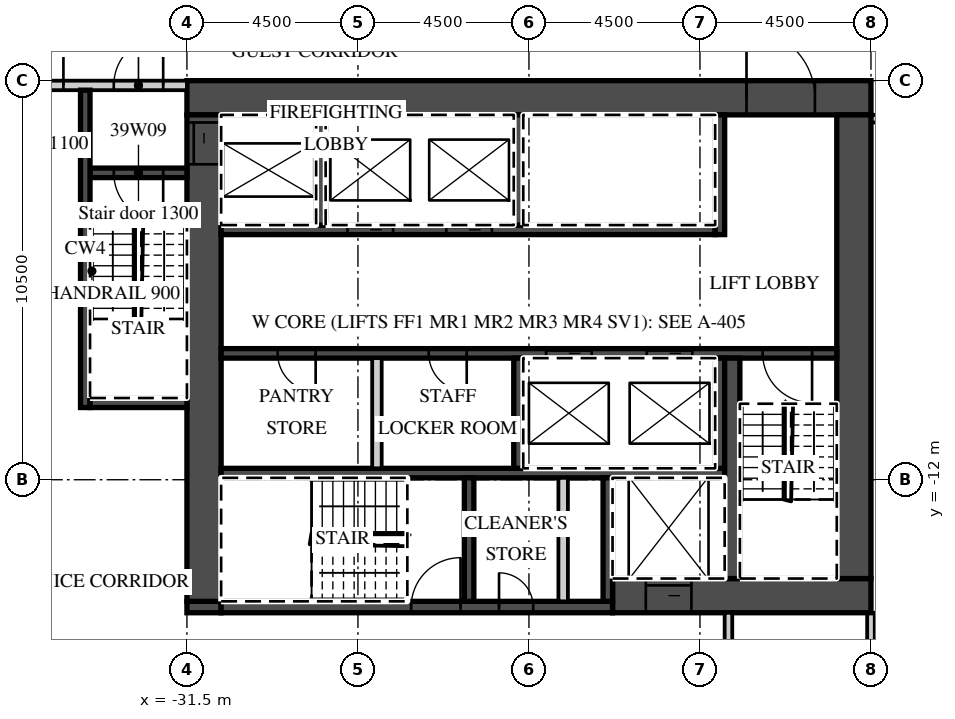
"""IFC4 building model, lengths in metres.
Left out: names, types, materials, properties, quantities, classifications, styles, units other than length and angle.
Written with IfcOpenShell. Run it as: python <this file> out.ifc"""

import sys

from ifc_helpers import new_model, si_unit, direction, frame, frame_2d, origin, place, context, subcontext, project, spatial, rectangle, extrude, element, fill, save


model = new_model("IFC4")
c1 = context("Model", 3, precision=1e-05, world=origin(), true_north=direction((0.0, 1.0)))
c2 = subcontext(c1, "Body", "Model", "MODEL_VIEW")
j1 = project(units=[si_unit("LENGTHUNIT", "METRE"), si_unit("PLANEANGLEUNIT", "RADIAN")], contexts=[c1])
p1 = place(None, origin())
s1 = spatial("IfcSite", under=j1, at=p1, CompositionType="ELEMENT")
p2 = place(p1, origin())
s2 = spatial("IfcBuilding", under=s1, at=p2, CompositionType="ELEMENT")
p3 = place(p2, frame((0.0, 0.0, 170.2)))
s3 = spatial("IfcBuildingStorey", under=s2, at=p3, CompositionType="ELEMENT", Elevation=170.2)
p4 = place(p3, frame((-13.5, -22.3, 0.0), z_axis=(0.0, 0.0, 1.0), x_axis=(0.0, 1.0, 0.0)))
e1 = element("IfcWall", 1, at=p4, inside=s3, PredefinedType="PARTITIONING", context=c2, shape_type="SweptSolid", body=[
    extrude(rectangle(XDim=6.8, YDim=0.2, at=frame_2d((3.4, 0.0))), origin(), (0.0, 0.0, 1.0), 3.02),
])
p5 = place(p3, frame((-13.5, -2.5, 0.0), z_axis=(0.0, 0.0, 1.0), x_axis=(1.0, 0.0, 0.0)))
e2 = element("IfcWall", 2, at=p5, inside=s3, PredefinedType="PARTITIONING", context=c2, shape_type="SweptSolid", body=[
    extrude(rectangle(XDim=27.0, YDim=0.2, at=frame_2d((13.5, 0.0))), origin(), (0.0, 0.0, 1.0), 3.02),
])
p6 = place(p5, frame((0.575, 0.0, 0.0)))
e3 = element("IfcOpeningElement", 3, at=p6, cuts=e2, PredefinedType="OPENING", context=c2, shape_type="SweptSolid", body=[
    extrude(rectangle(XDim=1.0, YDim=2.1, at=frame_2d((0.5, 1.05))), frame((0.0, 0.11, 0.0), z_axis=(0.0, -1.0, 0.0), x_axis=(1.0, 0.0, 0.0)), (0.0, 0.0, 1.0), 0.22),
])
p7 = place(p5, frame((9.863, 0.0, 0.0)))
e4 = element("IfcOpeningElement", 4, at=p7, cuts=e2, PredefinedType="OPENING", context=c2, shape_type="SweptSolid", body=[
    extrude(rectangle(XDim=1.2, YDim=2.1, at=frame_2d((0.6, 1.05))), frame((0.0, 0.11, 0.0), z_axis=(0.0, -1.0, 0.0), x_axis=(1.0, 0.0, 0.0)), (0.0, 0.0, 1.0), 0.22),
])
p8 = place(p5, frame((15.938, 0.0, 0.0)))
e5 = element("IfcOpeningElement", 5, at=p8, cuts=e2, PredefinedType="OPENING", context=c2, shape_type="SweptSolid", body=[
    extrude(rectangle(XDim=1.2, YDim=2.1, at=frame_2d((0.6, 1.05))), frame((0.0, 0.11, 0.0), z_axis=(0.0, -1.0, 0.0), x_axis=(1.0, 0.0, 0.0)), (0.0, 0.0, 1.0), 0.22),
])
p9 = place(p5, frame((23.075, 0.0, 0.0)))
e6 = element("IfcOpeningElement", 6, at=p9, cuts=e2, PredefinedType="OPENING", context=c2, shape_type="SweptSolid", body=[
    extrude(rectangle(XDim=1.0, YDim=2.1, at=frame_2d((0.5, 1.05))), frame((0.0, 0.11, 0.0), z_axis=(0.0, -1.0, 0.0), x_axis=(1.0, 0.0, 0.0)), (0.0, 0.0, 1.0), 0.22),
])
p10 = place(p3, frame((-31.5, -1.95, 0.0), z_axis=(0.0, 0.0, 1.0), x_axis=(1.0, 0.0, 0.0)))
e7 = element("IfcWall", 7, at=p10, inside=s3, PredefinedType="SHEAR", context=c2, shape_type="SweptSolid", body=[
    extrude(rectangle(XDim=18.0, YDim=0.9, at=frame_2d((9.0, 0.0))), origin(), (0.0, 0.0, 1.0), 3.02),
])
p11 = place(p10, frame((14.725, 0.0, 0.0)))
e8 = element("IfcOpeningElement", 8, at=p11, cuts=e7, PredefinedType="OPENING", context=c2, shape_type="SweptSolid", body=[
    extrude(rectangle(XDim=1.8, YDim=2.1, at=frame_2d((0.9, 1.05))), frame((0.0, 0.46, 0.0), z_axis=(0.0, -1.0, 0.0), x_axis=(1.0, 0.0, 0.0)), (0.0, 0.0, 1.0), 0.92),
])
p12 = place(p3, frame((-20.3, -15.05, 0.0), z_axis=(0.0, 0.0, 1.0), x_axis=(1.0, 0.0, 0.0)))
e9 = element("IfcWall", 9, at=p12, inside=s3, PredefinedType="SHEAR", context=c2, shape_type="SweptSolid", body=[
    extrude(rectangle(XDim=6.8, YDim=0.9, at=frame_2d((3.4, 0.0))), origin(), (0.0, 0.0, 1.0), 3.02),
])
p13 = place(p12, frame((0.875, 0.0, 0.0)))
e10 = element("IfcOpeningElement", 10, at=p13, cuts=e9, PredefinedType="OPENING", context=c2, shape_type="SweptSolid", body=[
    extrude(rectangle(XDim=1.2, YDim=2.1, at=frame_2d((0.6, 1.05))), frame((0.0, 0.46, 0.0), z_axis=(0.0, -1.0, 0.0), x_axis=(1.0, 0.0, 0.0)), (0.0, 0.0, 1.0), 0.92),
])
p14 = place(p3, frame((-31.5, -15.35, 0.0), z_axis=(0.0, 0.0, 1.0), x_axis=(1.0, 0.0, 0.0)))
e11 = element("IfcWall", 11, at=p14, inside=s3, PredefinedType="SHEAR", context=c2, shape_type="SweptSolid", body=[
    extrude(rectangle(XDim=0.9, YDim=0.3, at=frame_2d((0.45, 0.0))), origin(), (0.0, 0.0, 1.0), 3.02),
])
p15 = place(p3, frame((-30.6, -15.35, 0.0), z_axis=(0.0, 0.0, 1.0), x_axis=(1.0, 0.0, 0.0)))
e12 = element("IfcWall", 12, at=p15, inside=s3, PredefinedType="SHEAR", context=c2, shape_type="SweptSolid", body=[
    extrude(rectangle(XDim=10.3, YDim=0.3, at=frame_2d((5.15, 0.0))), origin(), (0.0, 0.0, 1.0), 3.02),
])
p16 = place(p15, frame((5.0, 0.0, 0.0)))
e13 = element("IfcOpeningElement", 13, at=p16, cuts=e12, PredefinedType="OPENING", context=c2, shape_type="SweptSolid", body=[
    extrude(rectangle(XDim=1.3, YDim=2.1, at=frame_2d((0.65, 1.05))), frame((0.0, 0.16, 0.0), z_axis=(0.0, -1.0, 0.0), x_axis=(1.0, 0.0, 0.0)), (0.0, 0.0, 1.0), 0.32),
])
p17 = place(p15, frame((7.312, 0.0, 0.0)))
e14 = element("IfcOpeningElement", 14, at=p17, cuts=e12, PredefinedType="OPENING", context=c2, shape_type="SweptSolid", body=[
    extrude(rectangle(XDim=0.9, YDim=2.1, at=frame_2d((0.45, 1.05))), frame((0.0, 0.16, 0.0), z_axis=(0.0, -1.0, 0.0), x_axis=(1.0, 0.0, 0.0)), (0.0, 0.0, 1.0), 0.32),
])
p18 = place(p3, frame((-31.05, -15.2, 0.0), z_axis=(0.0, 0.0, 1.0), x_axis=(0.0, 1.0, 0.0)))
e15 = element("IfcWall", 15, at=p18, inside=s3, PredefinedType="SHEAR", context=c2, shape_type="SweptSolid", body=[
    extrude(rectangle(XDim=12.8, YDim=0.9, at=frame_2d((6.4, 0.0))), origin(), (0.0, 0.0, 1.0), 3.02),
])
p19 = place(p18, frame((11.5, 0.0, 0.0)))
e16 = element("IfcOpeningElement", 16, at=p19, cuts=e15, PredefinedType="OPENING", context=c2, shape_type="SweptSolid", body=[
    extrude(rectangle(XDim=1.1, YDim=2.1, at=frame_2d((0.55, 1.05))), frame((0.0, 0.46, 0.0), z_axis=(0.0, -1.0, 0.0), x_axis=(1.0, 0.0, 0.0)), (0.0, 0.0, 1.0), 0.92),
])
p20 = place(p3, frame((-13.95, -14.6, 0.0), z_axis=(0.0, 0.0, 1.0), x_axis=(0.0, 1.0, 0.0)))
e17 = element("IfcWall", 17, at=p20, inside=s3, PredefinedType="SHEAR", context=c2, shape_type="SweptSolid", body=[
    extrude(rectangle(XDim=12.2, YDim=0.9, at=frame_2d((6.1, 0.0))), origin(), (0.0, 0.0, 1.0), 3.02),
])
p21 = place(p3, frame((-30.6, -5.425, 0.0), z_axis=(0.0, 0.0, 1.0), x_axis=(1.0, 0.0, 0.0)))
e18 = element("IfcWall", 18, at=p21, inside=s3, PredefinedType="SHEAR", context=c2, shape_type="SweptSolid", body=[
    extrude(rectangle(XDim=13.0, YDim=0.25, at=frame_2d((6.5, 0.0))), origin(), (0.0, 0.0, 1.0), 3.02),
])
p22 = place(p21, frame((3.325, 0.0, 0.0)))
e19 = element("IfcOpeningElement", 19, at=p22, cuts=e18, PredefinedType="OPENING", context=c2, shape_type="SweptSolid", body=[
    extrude(rectangle(XDim=1.2, YDim=2.1, at=frame_2d((0.6, 1.05))), frame((0.0, 0.135, 0.0), z_axis=(0.0, -1.0, 0.0), x_axis=(1.0, 0.0, 0.0)), (0.0, 0.0, 1.0), 0.27),
])
p23 = place(p21, frame((5.925, 0.0, 0.0)))
e20 = element("IfcOpeningElement", 20, at=p23, cuts=e18, PredefinedType="OPENING", context=c2, shape_type="SweptSolid", body=[
    extrude(rectangle(XDim=1.2, YDim=2.1, at=frame_2d((0.6, 1.05))), frame((0.0, 0.135, 0.0), z_axis=(0.0, -1.0, 0.0), x_axis=(1.0, 0.0, 0.0)), (0.0, 0.0, 1.0), 0.27),
])
p24 = place(p3, frame((-17.475, -5.55, 0.0), z_axis=(0.0, 0.0, 1.0), x_axis=(0.0, 1.0, 0.0)))
e21 = element("IfcWall", 21, at=p24, inside=s3, PredefinedType="SHEAR", context=c2, shape_type="SweptSolid", body=[
    extrude(rectangle(XDim=3.15, YDim=0.25, at=frame_2d((1.575, 0.0))), origin(), (0.0, 0.0, 1.0), 3.02),
])
for number, where, z_axis, x_axis in (
    (22, (-27.975, -5.3, 0.0), (0.0, 0.0, 1.0), (0.0, 1.0, 0.0)),
    (23, (-22.775, -5.3, 0.0), (0.0, 0.0, 1.0), (0.0, 1.0, 0.0)),
):
    element("IfcWall", number, at=place(p3, frame(where, z_axis=z_axis, x_axis=x_axis)), inside=s3, PredefinedType="SHEAR", context=c2, shape_type="SweptSolid", body=[
        extrude(rectangle(XDim=2.9, YDim=0.25, at=frame_2d((1.45, 0.0))), origin(), (0.0, 0.0, 1.0), 3.02),
    ])
p25 = place(p3, frame((-30.6, -8.675, 0.0), z_axis=(0.0, 0.0, 1.0), x_axis=(1.0, 0.0, 0.0)))
e24 = element("IfcWall", 24, at=p25, inside=s3, PredefinedType="SHEAR", context=c2, shape_type="SweptSolid", body=[
    extrude(rectangle(XDim=16.2, YDim=0.25, at=frame_2d((8.1, 0.0))), origin(), (0.0, 0.0, 1.0), 3.02),
])
p26 = place(p25, frame((8.55, 0.0, 0.0)))
e25 = element("IfcOpeningElement", 25, at=p26, cuts=e24, PredefinedType="OPENING", context=c2, shape_type="SweptSolid", body=[
    extrude(rectangle(XDim=1.2, YDim=2.1, at=frame_2d((0.6, 1.05))), frame((0.0, 0.135, 0.0), z_axis=(0.0, -1.0, 0.0), x_axis=(1.0, 0.0, 0.0)), (0.0, 0.0, 1.0), 0.27),
])
p27 = place(p25, frame((11.2, 0.0, 0.0)))
e26 = element("IfcOpeningElement", 26, at=p27, cuts=e24, PredefinedType="OPENING", context=c2, shape_type="SweptSolid", body=[
    extrude(rectangle(XDim=1.2, YDim=2.1, at=frame_2d((0.6, 1.05))), frame((0.0, 0.135, 0.0), z_axis=(0.0, -1.0, 0.0), x_axis=(1.0, 0.0, 0.0)), (0.0, 0.0, 1.0), 0.27),
])
p28 = place(p25, frame((14.25, 0.0, 0.0)))
e27 = element("IfcOpeningElement", 27, at=p28, cuts=e24, PredefinedType="OPENING", context=c2, shape_type="SweptSolid", body=[
    extrude(rectangle(XDim=1.3, YDim=2.1, at=frame_2d((0.65, 1.05))), frame((0.0, 0.135, 0.0), z_axis=(0.0, -1.0, 0.0), x_axis=(1.0, 0.0, 0.0)), (0.0, 0.0, 1.0), 0.27),
])
p29 = place(p25, frame((1.488, 0.0, 0.0)))
e28 = element("IfcOpeningElement", 28, at=p29, cuts=e24, PredefinedType="OPENING", context=c2, shape_type="SweptSolid", body=[
    extrude(rectangle(XDim=1.0, YDim=2.1, at=frame_2d((0.5, 1.05))), frame((0.0, 0.135, 0.0), z_axis=(0.0, -1.0, 0.0), x_axis=(1.0, 0.0, 0.0)), (0.0, 0.0, 1.0), 0.27),
])
p30 = place(p25, frame((5.462, 0.0, 0.0)))
e29 = element("IfcOpeningElement", 29, at=p30, cuts=e24, PredefinedType="OPENING", context=c2, shape_type="SweptSolid", body=[
    extrude(rectangle(XDim=1.0, YDim=2.1, at=frame_2d((0.5, 1.05))), frame((0.0, 0.135, 0.0), z_axis=(0.0, -1.0, 0.0), x_axis=(1.0, 0.0, 0.0)), (0.0, 0.0, 1.0), 0.27),
])
p31 = place(p3, frame((-30.6, -11.825, 0.0), z_axis=(0.0, 0.0, 1.0), x_axis=(1.0, 0.0, 0.0)))
e30 = element("IfcWall", 30, at=p31, inside=s3, PredefinedType="SHEAR", context=c2, shape_type="SweptSolid", body=[
    extrude(rectangle(XDim=13.25, YDim=0.25, at=frame_2d((6.625, 0.0))), origin(), (0.0, 0.0, 1.0), 3.02),
])
for number, where, z_axis, x_axis in (
    (31, (-17.475, -11.7, 0.0), (0.0, 0.0, 1.0), (0.0, 1.0, 0.0)),
    (32, (-22.775, -11.7, 0.0), (0.0, 0.0, 1.0), (0.0, 1.0, 0.0)),
):
    element("IfcWall", number, at=place(p3, frame(where, z_axis=z_axis, x_axis=x_axis)), inside=s3, PredefinedType="SHEAR", context=c2, shape_type="SweptSolid", body=[
        extrude(rectangle(XDim=2.9, YDim=0.25, at=frame_2d((1.45, 0.0))), origin(), (0.0, 0.0, 1.0), 3.02),
    ])
p32 = place(p3, frame((-26.5, -11.7, 0.0), z_axis=(0.0, 0.0, 1.0), x_axis=(0.0, 1.0, 0.0)))
e33 = element("IfcWall", 33, at=p32, inside=s3, PredefinedType="PARTITIONING", context=c2, shape_type="SweptSolid", body=[
    extrude(rectangle(XDim=2.9, YDim=0.25, at=frame_2d((1.45, 0.0))), origin(), (0.0, 0.0, 1.0), 3.02),
])
p33 = place(p3, frame((-17.15, -14.6, 0.0), z_axis=(0.0, 0.0, 1.0), x_axis=(0.0, 1.0, 0.0)))
e34 = element("IfcWall", 34, at=p33, inside=s3, PredefinedType="SHEAR", context=c2, shape_type="SweptSolid", body=[
    extrude(rectangle(XDim=5.8, YDim=0.4, at=frame_2d((2.9, 0.0))), origin(), (0.0, 0.0, 1.0), 3.02),
])
for number, where, z_axis, x_axis in (
    (35, (-20.425, -15.2, 0.0), (0.0, 0.0, 1.0), (0.0, 1.0, 0.0)),
    (36, (-24.075, -15.2, 0.0), (0.0, 0.0, 1.0), (0.0, 1.0, 0.0)),
):
    element("IfcWall", number, at=place(p3, frame(where, z_axis=z_axis, x_axis=x_axis)), inside=s3, PredefinedType="SHEAR", context=c2, shape_type="SweptSolid", body=[
        extrude(rectangle(XDim=3.25, YDim=0.25, at=frame_2d((1.625, 0.0))), origin(), (0.0, 0.0, 1.0), 3.02),
    ])
p34 = place(p3, frame((-21.6, -15.2, 0.0), z_axis=(0.0, 0.0, 1.0), x_axis=(0.0, 1.0, 0.0)))
e37 = element("IfcWall", 37, at=p34, inside=s3, PredefinedType="PARTITIONING", context=c2, shape_type="SweptSolid", body=[
    extrude(rectangle(XDim=3.25, YDim=0.25, at=frame_2d((1.625, 0.0))), origin(), (0.0, 0.0, 1.0), 3.02),
])
p35 = place(p3, frame((-42.632, -1.625, 0.0), z_axis=(0.0, 0.0, 1.0), x_axis=(1.0, 0.0, 0.0)))
e38 = element("IfcWall", 38, at=p35, inside=s3, PredefinedType="PARTITIONING", context=c2, shape_type="SweptSolid", body=[
    extrude(rectangle(XDim=11.132, YDim=0.25, at=frame_2d((5.566, 0.0))), origin(), (0.0, 0.0, 1.0), 3.02),
])
p36 = place(p35, frame((9.207, 0.0, 0.0)))
e39 = element("IfcOpeningElement", 39, at=p36, cuts=e38, PredefinedType="OPENING", context=c2, shape_type="SweptSolid", body=[
    extrude(rectangle(XDim=1.3, YDim=2.1, at=frame_2d((0.65, 1.05))), frame((0.0, 0.135, 0.0), z_axis=(0.0, -1.0, 0.0), x_axis=(1.0, 0.0, 0.0)), (0.0, 0.0, 1.0), 0.27),
])
p37 = place(p35, frame((6.781, 0.0, 0.0)))
e40 = element("IfcOpeningElement", 40, at=p37, cuts=e38, PredefinedType="OPENING", context=c2, shape_type="SweptSolid", body=[
    extrude(rectangle(XDim=1.1, YDim=2.1, at=frame_2d((0.55, 1.05))), frame((0.0, 0.135, 0.0), z_axis=(0.0, -1.0, 0.0), x_axis=(1.0, 0.0, 0.0)), (0.0, 0.0, 1.0), 0.27),
])
p38 = place(p3, frame((-34.05, -3.925, 0.0), z_axis=(0.0, 0.0, 1.0), x_axis=(1.0, 0.0, 0.0)))
e41 = element("IfcWall", 41, at=p38, inside=s3, PredefinedType="SHEAR", context=c2, shape_type="SweptSolid", body=[
    extrude(rectangle(XDim=2.55, YDim=0.25, at=frame_2d((1.275, 0.0))), origin(), (0.0, 0.0, 1.0), 3.02),
])
p39 = place(p38, frame((0.625, 0.0, 0.0)))
e42 = element("IfcOpeningElement", 42, at=p39, cuts=e41, PredefinedType="OPENING", context=c2, shape_type="SweptSolid", body=[
    extrude(rectangle(XDim=1.3, YDim=2.1, at=frame_2d((0.65, 1.05))), frame((0.0, 0.135, 0.0), z_axis=(0.0, -1.0, 0.0), x_axis=(1.0, 0.0, 0.0)), (0.0, 0.0, 1.0), 0.27),
])
p40 = place(p3, frame((-34.175, -10.1, 0.0), z_axis=(0.0, 0.0, 1.0), x_axis=(0.0, 1.0, 0.0)))
e43 = element("IfcWall", 43, at=p40, inside=s3, PredefinedType="SHEAR", context=c2, shape_type="SweptSolid", body=[
    extrude(rectangle(XDim=8.35, YDim=0.25, at=frame_2d((4.175, 0.0))), origin(), (0.0, 0.0, 1.0), 3.02),
])
p41 = place(p3, frame((-34.05, -9.975, 0.0), z_axis=(0.0, 0.0, 1.0), x_axis=(1.0, 0.0, 0.0)))
e44 = element("IfcWall", 44, at=p41, inside=s3, PredefinedType="SHEAR", context=c2, shape_type="SweptSolid", body=[
    extrude(rectangle(XDim=2.55, YDim=0.25, at=frame_2d((1.275, 0.0))), origin(), (0.0, 0.0, 1.0), 3.02),
])
p42 = place(p3, frame((-17.25, -17.7, 0.0), z_axis=(0.0, 0.0, 1.0), x_axis=(0.0, 1.0, 0.0)))
e45 = element("IfcWall", 45, at=p42, inside=s3, PredefinedType="PARTITIONING", context=c2, shape_type="SweptSolid", body=[
    extrude(rectangle(XDim=2.2, YDim=0.2, at=frame_2d((1.1, 0.0))), origin(), (0.0, 0.0, 1.0), 3.02),
])
p43 = place(p26, origin())
e46 = element("IfcDoor", 46, at=p43, inside=s3, OperationType="SLIDING_TO_LEFT", PredefinedType="DOOR", context=c2, shape_type="SweptSolid", body=[
    extrude(rectangle(XDim=1.2, YDim=2.1, at=frame_2d((0.6, 1.05))), frame((0.0, 0.025, 0.0), z_axis=(0.0, -1.0, 0.0), x_axis=(1.0, 0.0, 0.0)), (0.0, 0.0, 1.0), 0.05),
])
fill(e25, e46)
p44 = place(p27, origin())
e47 = element("IfcDoor", 47, at=p44, inside=s3, OperationType="SLIDING_TO_RIGHT", PredefinedType="DOOR", context=c2, shape_type="SweptSolid", body=[
    extrude(rectangle(XDim=1.2, YDim=2.1, at=frame_2d((0.6, 1.05))), frame((0.0, 0.025, 0.0), z_axis=(0.0, -1.0, 0.0), x_axis=(1.0, 0.0, 0.0)), (0.0, 0.0, 1.0), 0.05),
])
fill(e26, e47)
p45 = place(p22, origin())
e48 = element("IfcDoor", 48, at=p45, inside=s3, OperationType="SLIDING_TO_RIGHT", PredefinedType="DOOR", context=c2, shape_type="SweptSolid", body=[
    extrude(rectangle(XDim=1.2, YDim=2.1, at=frame_2d((0.6, 1.05))), frame((0.0, 0.025, 0.0), z_axis=(0.0, -1.0, 0.0), x_axis=(1.0, 0.0, 0.0)), (0.0, 0.0, 1.0), 0.05),
])
fill(e19, e48)
p46 = place(p23, origin())
e49 = element("IfcDoor", 49, at=p46, inside=s3, OperationType="SLIDING_TO_RIGHT", PredefinedType="DOOR", context=c2, shape_type="SweptSolid", body=[
    extrude(rectangle(XDim=1.2, YDim=2.1, at=frame_2d((0.6, 1.05))), frame((0.0, 0.025, 0.0), z_axis=(0.0, -1.0, 0.0), x_axis=(1.0, 0.0, 0.0)), (0.0, 0.0, 1.0), 0.05),
])
fill(e20, e49)
p47 = place(p13, origin())
e50 = element("IfcDoor", 50, at=p47, inside=s3, OperationType="SLIDING_TO_LEFT", PredefinedType="DOOR", context=c2, shape_type="SweptSolid", body=[
    extrude(rectangle(XDim=1.2, YDim=2.1, at=frame_2d((0.6, 1.05))), frame((0.0, 0.025, 0.0), z_axis=(0.0, -1.0, 0.0), x_axis=(1.0, 0.0, 0.0)), (0.0, 0.0, 1.0), 0.05),
])
fill(e10, e50)
p48 = place(p19, origin())
e51 = element("IfcDoor", 51, at=p48, inside=s3, OperationType="SLIDING_TO_RIGHT", PredefinedType="DOOR", context=c2, shape_type="SweptSolid", body=[
    extrude(rectangle(XDim=1.1, YDim=2.1, at=frame_2d((0.55, 1.05))), frame((0.0, 0.025, 0.0), z_axis=(0.0, -1.0, 0.0), x_axis=(1.0, 0.0, 0.0)), (0.0, 0.0, 1.0), 0.05),
])
fill(e16, e51)
p49 = place(p11, origin())
e52 = element("IfcDoor", 52, at=p49, inside=s3, OperationType="DOUBLE_DOOR_DOUBLE_SWING", PredefinedType="DOOR", context=c2, shape_type="SweptSolid", body=[
    extrude(rectangle(XDim=1.8, YDim=2.1, at=frame_2d((0.9, 1.05))), frame((0.0, 0.025, 0.0), z_axis=(0.0, -1.0, 0.0), x_axis=(1.0, 0.0, 0.0)), (0.0, 0.0, 1.0), 0.05),
])
fill(e8, e52)
p50 = place(p36, origin())
e53 = element("IfcDoor", 53, at=p50, inside=s3, OperationType="SINGLE_SWING_RIGHT", PredefinedType="DOOR", context=c2, shape_type="SweptSolid", body=[
    extrude(rectangle(XDim=1.3, YDim=2.1, at=frame_2d((0.65, 1.05))), frame((0.0, 0.025, 0.0), z_axis=(0.0, -1.0, 0.0), x_axis=(1.0, 0.0, 0.0)), (0.0, 0.0, 1.0), 0.05),
])
fill(e39, e53)
p51 = place(p39, origin())
e54 = element("IfcDoor", 54, at=p51, inside=s3, OperationType="SINGLE_SWING_RIGHT", PredefinedType="DOOR", context=c2, shape_type="SweptSolid", body=[
    extrude(rectangle(XDim=1.3, YDim=2.1, at=frame_2d((0.65, 1.05))), frame((0.0, 0.025, 0.0), z_axis=(0.0, -1.0, 0.0), x_axis=(1.0, 0.0, 0.0)), (0.0, 0.0, 1.0), 0.05),
])
fill(e42, e54)
p52 = place(p37, origin())
e55 = element("IfcDoor", 55, at=p52, inside=s3, OperationType="SINGLE_SWING_RIGHT", PredefinedType="DOOR", context=c2, shape_type="SweptSolid", body=[
    extrude(rectangle(XDim=1.1, YDim=2.1, at=frame_2d((0.55, 1.05))), frame((0.0, 0.025, 0.0), z_axis=(0.0, -1.0, 0.0), x_axis=(1.0, 0.0, 0.0)), (0.0, 0.0, 1.0), 0.05),
])
fill(e40, e55)
p53 = place(p28, origin())
e56 = element("IfcDoor", 56, at=p53, inside=s3, OperationType="SINGLE_SWING_RIGHT", PredefinedType="DOOR", context=c2, shape_type="SweptSolid", body=[
    extrude(rectangle(XDim=1.3, YDim=2.1, at=frame_2d((0.65, 1.05))), frame((0.0, 0.025, 0.0), z_axis=(0.0, -1.0, 0.0), x_axis=(1.0, 0.0, 0.0)), (0.0, 0.0, 1.0), 0.05),
])
fill(e27, e56)
p54 = place(p16, origin())
e57 = element("IfcDoor", 57, at=p54, inside=s3, OperationType="SINGLE_SWING_RIGHT", PredefinedType="DOOR", context=c2, shape_type="SweptSolid", body=[
    extrude(rectangle(XDim=1.3, YDim=2.1, at=frame_2d((0.65, 1.05))), frame((0.0, 0.025, 0.0), z_axis=(0.0, -1.0, 0.0), x_axis=(1.0, 0.0, 0.0)), (0.0, 0.0, 1.0), 0.05),
])
fill(e13, e57)
p55 = place(p17, origin())
e58 = element("IfcDoor", 58, at=p55, inside=s3, OperationType="SINGLE_SWING_LEFT", PredefinedType="DOOR", context=c2, shape_type="SweptSolid", body=[
    extrude(rectangle(XDim=0.9, YDim=2.1, at=frame_2d((0.45, 1.05))), frame((0.0, 0.025, 0.0), z_axis=(0.0, -1.0, 0.0), x_axis=(1.0, 0.0, 0.0)), (0.0, 0.0, 1.0), 0.05),
])
fill(e14, e58)
p56 = place(p29, origin())
e59 = element("IfcDoor", 59, at=p56, inside=s3, OperationType="SINGLE_SWING_RIGHT", PredefinedType="DOOR", context=c2, shape_type="SweptSolid", body=[
    extrude(rectangle(XDim=1.0, YDim=2.1, at=frame_2d((0.5, 1.05))), frame((0.0, 0.025, 0.0), z_axis=(0.0, -1.0, 0.0), x_axis=(1.0, 0.0, 0.0)), (0.0, 0.0, 1.0), 0.05),
])
fill(e28, e59)
p57 = place(p30, origin())
e60 = element("IfcDoor", 60, at=p57, inside=s3, OperationType="SINGLE_SWING_RIGHT", PredefinedType="DOOR", context=c2, shape_type="SweptSolid", body=[
    extrude(rectangle(XDim=1.0, YDim=2.1, at=frame_2d((0.5, 1.05))), frame((0.0, 0.025, 0.0), z_axis=(0.0, -1.0, 0.0), x_axis=(1.0, 0.0, 0.0)), (0.0, 0.0, 1.0), 0.05),
])
fill(e29, e60)
save(model, sys.argv[1])
